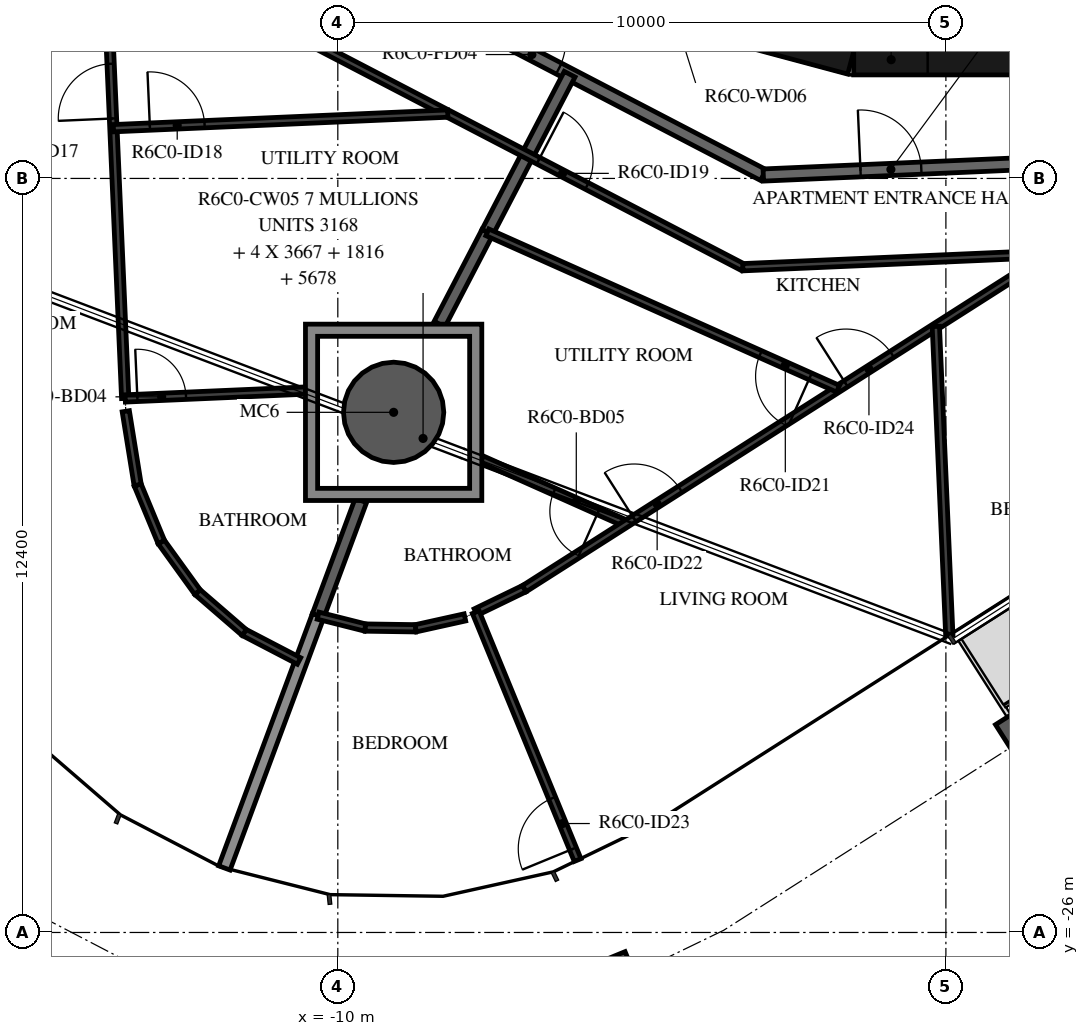
"""IFC4 building model, lengths in metres.
Left out: names, types, materials, properties, quantities, classifications, styles, units other than length and angle.
Written with IfcOpenShell. Run it as: python <this file> out.ifc"""

import sys

from ifc_helpers import new_model, si_unit, direction, frame, frame_2d, origin, origin_2d, place, context, subcontext, project, spatial, polyline, rectangle, hollow_circle, i_section, outline, extrude, element, fill, save


model = new_model("IFC4")
c1 = context("Model", 3, precision=1e-05, world=origin(), true_north=direction((0.0, 1.0)))
c2 = subcontext(c1, "Body", "Model", "MODEL_VIEW")
j1 = project(units=[si_unit("LENGTHUNIT", "METRE"), si_unit("PLANEANGLEUNIT", "RADIAN")], contexts=[c1])
p1 = place(None, origin())
s1 = spatial("IfcSite", under=j1, at=p1, CompositionType="ELEMENT")
p2 = place(p1, origin())
s2 = spatial("IfcBuilding", under=s1, at=p2, CompositionType="ELEMENT")
p3 = place(p2, frame((0.0, 0.0, 247.7)))
s3 = spatial("IfcBuildingStorey", under=s2, at=p3, CompositionType="ELEMENT", Elevation=247.7)
p4 = place(p3, frame((-9.082, -17.446, -0.38), z_axis=(0.0, 0.0, 1.0), x_axis=(1.0, 0.0, 0.0)))
e1 = element("IfcColumn", 1, at=p4, inside=s3, PredefinedType="COLUMN", context=c2, shape_type="SweptSolid", body=[
    extrude(hollow_circle(Radius=0.825, WallThickness=0.04, at=origin_2d()), origin(), (0.0, 0.0, 1.0), 3.5),
])
for number, where, z_axis, x_axis in (
    (2, (-5.243, -26.789, -0.38), (0.0, 0.0, 1.0), (-0.925, -0.38, 0.0)),
    (3, (1.185, -22.881, -0.38), (0.0, 0.0, 1.0), (-0.843, -0.537, 0.0)),
):
    element("IfcColumn", number, at=place(p3, frame(where, z_axis=z_axis, x_axis=x_axis)), inside=s3, PredefinedType="COLUMN", context=c2, shape_type="SweptSolid", body=[
        extrude(i_section(OverallWidth=0.3, OverallDepth=0.9, WebThickness=0.019, FlangeThickness=0.035, FilletRadius=0.03, at=origin_2d()), origin(), (0.0, 0.0, 1.0), 3.5),
    ])
p5 = place(p3, frame((-4.479, -10.858, 0.0), z_axis=(0.0, 0.0, 1.0), x_axis=(0.965948410781, -0.258734743916, 0.0)))
e4 = element("IfcWall", 4, at=p5, inside=s3, PredefinedType="SHEAR", context=c2, shape_type="SweptSolid", body=[
    extrude(rectangle(XDim=3.033, YDim=0.5, at=frame_2d((1.516, 0.0))), origin(), (0.0, 0.0, 1.0), 3.12),
])
p6 = place(p3, frame((-1.516, -11.647, 0.0), z_axis=(0.0, 0.0, 1.0), x_axis=(1.0, 0.0, 0.0)))
e5 = element("IfcWall", 5, at=p6, inside=s3, PredefinedType="SHEAR", context=c2, shape_type="SweptSolid", body=[
    extrude(rectangle(XDim=3.033, YDim=0.5, at=frame_2d((1.516, 0.0))), origin(), (0.0, 0.0, 1.0), 3.12),
])
p7 = place(p6, frame((0.016, 0.0, 0.0)))
e6 = element("IfcOpeningElement", 6, at=p7, cuts=e5, PredefinedType="OPENING", context=c2, shape_type="SweptSolid", body=[
    extrude(rectangle(XDim=1.2, YDim=2.1, at=frame_2d((0.6, 1.05))), frame((0.0, 0.26, 0.0), z_axis=(0.0, -1.0, 0.0), x_axis=(1.0, 0.0, 0.0)), (0.0, 0.0, 1.0), 0.52),
])
p8 = place(p3, frame((-9.372, -10.228, 0.0), z_axis=(0.0, 0.0, 1.0), x_axis=(0.887005184532, -0.461759464021, 0.0)))
e7 = element("IfcWall", 7, at=p8, inside=s3, PredefinedType="STANDARD", context=c2, shape_type="SweptSolid", body=[
    extrude(rectangle(XDim=7.181, YDim=0.2, at=frame_2d((3.591, 0.0))), origin(), (0.0, 0.0, 1.0), 3.12),
])
p9 = place(p8, frame((2.391, 0.0, 0.0)))
e8 = element("IfcOpeningElement", 8, at=p9, cuts=e7, PredefinedType="OPENING", context=c2, shape_type="SweptSolid", body=[
    extrude(rectangle(XDim=1.0, YDim=2.1, at=frame_2d((0.5, 1.05))), frame((0.0, 0.11, 0.0), z_axis=(0.0, -1.0, 0.0), x_axis=(1.0, 0.0, 0.0)), (0.0, 0.0, 1.0), 0.22),
])
p10 = place(p3, frame((-3.003, -13.544, 0.0), z_axis=(0.0, 0.0, 1.0), x_axis=(0.999048221872, 0.043619380718, 0.0)))
e9 = element("IfcWall", 9, at=p10, inside=s3, PredefinedType="STANDARD", context=c2, shape_type="SweptSolid", body=[
    extrude(rectangle(XDim=6.979, YDim=0.2, at=frame_2d((3.49, 0.0))), origin(), (0.0, 0.0, 1.0), 3.12),
])
p11 = place(p10, frame((1.6, 0.0, 0.0)))
e10 = element("IfcOpeningElement", 10, at=p11, cuts=e9, PredefinedType="OPENING", context=c2, shape_type="SweptSolid", body=[
    extrude(rectangle(XDim=1.0, YDim=2.1, at=frame_2d((0.5, 1.05))), frame((0.0, 0.11, 0.0), z_axis=(0.0, -1.0, 0.0), x_axis=(1.0, 0.0, 0.0)), (0.0, 0.0, 1.0), 0.22),
])
p12 = place(p3, frame((-7.541, -14.486, 0.0), z_axis=(0.0, 0.0, 1.0), x_axis=(0.461746051786, 0.88701216658, 0.0)))
e11 = element("IfcWall", 11, at=p12, inside=s3, PredefinedType="STANDARD", context=c2, shape_type="SweptSolid", body=[
    extrude(rectangle(XDim=2.931, YDim=0.2, at=frame_2d((1.466, 0.0))), origin(), (0.0, 0.0, 1.0), 3.12),
])
p13 = place(p3, frame((-11.865, -24.939, 0.0), z_axis=(0.0, 0.0, 1.0), x_axis=(0.348214227297, 0.937414983829, 0.0)))
e12 = element("IfcWall", 12, at=p13, inside=s3, PredefinedType="STANDARD", context=c2, shape_type="SweptSolid", body=[
    extrude(rectangle(XDim=4.426, YDim=0.2, at=frame_2d((2.213, 0.0))), origin(), (0.0, 0.0, 1.0), 2.73),
])
p14 = place(p3, frame((-8.327, -15.996, 0.0), z_axis=(0.0, 0.0, 1.0), x_axis=(0.461722915657, 0.887024210017, 0.0)))
e13 = element("IfcWall", 13, at=p14, inside=s3, PredefinedType="STANDARD", context=c2, shape_type="SweptSolid", body=[
    extrude(rectangle(XDim=1.703, YDim=0.2, at=frame_2d((0.851, 0.0))), origin(), (0.0, 0.0, 1.0), 3.12),
])
p15 = place(p3, frame((-10.324, -20.79, 0.0), z_axis=(0.0, 0.0, 1.0), x_axis=(0.348313973933, 0.937377925686, 0.0)))
e14 = element("IfcWall", 14, at=p15, inside=s3, PredefinedType="STANDARD", context=c2, shape_type="SweptSolid", body=[
    extrude(rectangle(XDim=2.02, YDim=0.2, at=frame_2d((1.01, 0.0))), origin(), (0.0, 0.0, 1.0), 3.12),
])
p16 = place(p3, frame((-10.421, -11.373, 0.0), z_axis=(0.0, 0.0, 1.0), x_axis=(0.887012970857, -0.461744506769, 0.0)))
e15 = element("IfcWall", 15, at=p16, inside=s3, PredefinedType="PARTITIONING", context=c2, shape_type="SweptSolid", body=[
    extrude(rectangle(XDim=7.985, YDim=0.12, at=frame_2d((3.992, 0.0))), origin(), (0.0, 0.0, 1.0), 3.12),
])
p17 = place(p16, frame((4.192, 0.0, 0.0)))
e16 = element("IfcOpeningElement", 16, at=p17, cuts=e15, PredefinedType="OPENING", context=c2, shape_type="SweptSolid", body=[
    extrude(rectangle(XDim=0.9, YDim=2.1, at=frame_2d((0.45, 1.05))), frame((0.0, 0.07, 0.0), z_axis=(0.0, -1.0, 0.0), x_axis=(1.0, 0.0, 0.0)), (0.0, 0.0, 1.0), 0.14),
])
p18 = place(p3, frame((-13.496, -17.218, 0.0), z_axis=(0.0, 0.0, 1.0), x_axis=(-0.043640714674, 0.999047290183, 0.0)))
e17 = element("IfcWall", 17, at=p18, inside=s3, PredefinedType="PARTITIONING", context=c2, shape_type="SweptSolid", body=[
    extrude(rectangle(XDim=8.487, YDim=0.12, at=frame_2d((4.243, 0.0))), origin(), (0.0, 0.0, 1.0), 3.12),
])
p19 = place(p18, frame((4.608, 0.0, 0.0)))
e18 = element("IfcOpeningElement", 18, at=p19, cuts=e17, PredefinedType="OPENING", context=c2, shape_type="SweptSolid", body=[
    extrude(rectangle(XDim=0.9, YDim=2.1, at=frame_2d((0.45, 1.05))), frame((0.0, 0.07, 0.0), z_axis=(0.0, -1.0, 0.0), x_axis=(1.0, 0.0, 0.0)), (0.0, 0.0, 1.0), 0.14),
])
p20 = place(p3, frame((-17.215, -14.57, 0.0), z_axis=(0.0, 0.0, 1.0), x_axis=(0.520949659667, 0.853587401555, 0.0)))
e19 = element("IfcWall", 19, at=p20, inside=s3, PredefinedType="PARTITIONING", context=c2, shape_type="SweptSolid", body=[
    extrude(rectangle(XDim=6.455, YDim=0.12, at=frame_2d((3.228, 0.0))), origin(), (0.0, 0.0, 1.0), 3.12),
])
p21 = place(p20, frame((1.2, 0.0, 0.0)))
e20 = element("IfcOpeningElement", 20, at=p21, cuts=e19, PredefinedType="OPENING", context=c2, shape_type="SweptSolid", body=[
    extrude(rectangle(XDim=0.9, YDim=2.1, at=frame_2d((0.45, 1.05))), frame((0.0, 0.07, 0.0), z_axis=(0.0, -1.0, 0.0), x_axis=(1.0, 0.0, 0.0)), (0.0, 0.0, 1.0), 0.14),
])
p22 = place(p3, frame((-13.69, -12.774, 0.0), z_axis=(0.0, 0.0, 1.0), x_axis=(0.999048778431, 0.043606631553, 0.0)))
e21 = element("IfcWall", 21, at=p22, inside=s3, PredefinedType="PARTITIONING", context=c2, shape_type="SweptSolid", body=[
    extrude(rectangle(XDim=5.503, YDim=0.12, at=frame_2d((2.752, 0.0))), origin(), (0.0, 0.0, 1.0), 3.12),
])
p23 = place(p22, frame((0.6, 0.0, 0.0)))
e22 = element("IfcOpeningElement", 22, at=p23, cuts=e21, PredefinedType="OPENING", context=c2, shape_type="SweptSolid", body=[
    extrude(rectangle(XDim=0.9, YDim=2.1, at=frame_2d((0.45, 1.05))), frame((0.0, 0.07, 0.0), z_axis=(0.0, -1.0, 0.0), x_axis=(1.0, 0.0, 0.0)), (0.0, 0.0, 1.0), 0.14),
])
for number, where, z_axis, x_axis in (
    (23, (-10.638, -21.536, 0.0), (0.0, 0.0, 1.0), (-0.887, 0.462, 0.0)),
    (24, (-11.539, -21.067, 0.0), (0.0, 0.0, 1.0), (-0.757, 0.654, 0.0)),
    (25, (-12.308, -20.402, 0.0), (0.0, 0.0, 1.0), (-0.585, 0.811, 0.0)),
):
    element("IfcWall", number, at=place(p3, frame(where, z_axis=z_axis, x_axis=x_axis)), inside=s3, PredefinedType="PARTITIONING", context=c2, shape_type="SweptSolid", body=[
        extrude(rectangle(XDim=1.016, YDim=0.12, at=frame_2d((0.508, 0.0))), origin(), (0.0, 0.0, 1.0), 3.12),
    ])
p24 = place(p3, frame((-12.903, -19.579, 0.0), z_axis=(0.0, 0.0, 1.0), x_axis=(-0.382754975976, 0.923849894932, 0.0)))
e26 = element("IfcWall", 26, at=p24, inside=s3, PredefinedType="PARTITIONING", context=c2, shape_type="SweptSolid", body=[
    extrude(rectangle(XDim=1.016, YDim=0.12, at=frame_2d((0.508, 0.0))), origin(), (0.0, 0.0, 1.0), 3.12),
])
p25 = place(p3, frame((-13.292, -18.64, 0.0), z_axis=(0.0, 0.0, 1.0), x_axis=(-0.159363796836, 0.98721992497, 0.0)))
e27 = element("IfcWall", 27, at=p25, inside=s3, PredefinedType="PARTITIONING", context=c2, shape_type="SweptSolid", body=[
    extrude(rectangle(XDim=1.227, YDim=0.12, at=frame_2d((0.614, 0.0))), origin(), (0.0, 0.0, 1.0), 3.12),
])
p26 = place(p3, frame((-13.496, -17.218, 0.0), z_axis=(0.0, 0.0, 1.0), x_axis=(0.999044946677, 0.043694330507, 0.0)))
e28 = element("IfcWall", 28, at=p26, inside=s3, PredefinedType="PARTITIONING", context=c2, shape_type="SweptSolid", body=[
    extrude(rectangle(XDim=2.967, YDim=0.12, at=frame_2d((1.483, 0.0))), origin(), (0.0, 0.0, 1.0), 3.12),
])
p27 = place(p26, frame((0.2, 0.0, 0.0)))
e29 = element("IfcOpeningElement", 29, at=p27, cuts=e28, PredefinedType="OPENING", context=c2, shape_type="SweptSolid", body=[
    extrude(rectangle(XDim=0.8, YDim=2.1, at=frame_2d((0.4, 1.05))), frame((0.0, 0.07, 0.0), z_axis=(0.0, -1.0, 0.0), x_axis=(1.0, 0.0, 0.0)), (0.0, 0.0, 1.0), 0.14),
])
p28 = place(p3, frame((-3.339, -15.06, 0.0), z_axis=(0.0, 0.0, 1.0), x_axis=(0.999047716945, 0.043630943905, 0.0)))
e30 = element("IfcWall", 30, at=p28, inside=s3, PredefinedType="PARTITIONING", context=c2, shape_type="SweptSolid", body=[
    extrude(rectangle(XDim=7.985, YDim=0.12, at=frame_2d((3.992, 0.0))), origin(), (0.0, 0.0, 1.0), 3.12),
])
p29 = place(p28, frame((5.253, 0.0, 0.0)))
e31 = element("IfcOpeningElement", 31, at=p29, cuts=e30, PredefinedType="OPENING", context=c2, shape_type="SweptSolid", body=[
    extrude(rectangle(XDim=0.9, YDim=2.1, at=frame_2d((0.45, 1.05))), frame((0.0, 0.07, 0.0), z_axis=(0.0, -1.0, 0.0), x_axis=(1.0, 0.0, 0.0)), (0.0, 0.0, 1.0), 0.14),
])
p30 = place(p3, frame((-10.324, -20.79, 0.0), z_axis=(0.0, 0.0, 1.0), x_axis=(0.969547579982, -0.244903021933, 0.0)))
e32 = element("IfcWall", 32, at=p30, inside=s3, PredefinedType="PARTITIONING", context=c2, shape_type="SweptSolid", body=[
    extrude(rectangle(XDim=0.801, YDim=0.12, at=frame_2d((0.4, 0.0))), origin(), (0.0, 0.0, 1.0), 3.12),
])
p31 = place(p3, frame((-9.548, -20.986, 0.0), z_axis=(0.0, 0.0, 1.0), x_axis=(0.999895921986, -0.014427237979, 0.0)))
e33 = element("IfcWall", 33, at=p31, inside=s3, PredefinedType="PARTITIONING", context=c2, shape_type="SweptSolid", body=[
    extrude(rectangle(XDim=0.829, YDim=0.12, at=frame_2d((0.415, 0.0))), origin(), (0.0, 0.0, 1.0), 3.12),
])
p32 = place(p3, frame((-8.719, -20.998, 0.0), z_axis=(0.0, 0.0, 1.0), x_axis=(0.976339323235, 0.216244134959, 0.0)))
e34 = element("IfcWall", 34, at=p32, inside=s3, PredefinedType="PARTITIONING", context=c2, shape_type="SweptSolid", body=[
    extrude(rectangle(XDim=0.829, YDim=0.12, at=frame_2d((0.414, 0.0))), origin(), (0.0, 0.0, 1.0), 3.12),
])
p33 = place(p3, frame((-5.256, -19.278, 0.0), z_axis=(0.0, 0.0, 1.0), x_axis=(-0.913284429849, 0.407322415532, 0.0)))
e35 = element("IfcWall", 35, at=p33, inside=s3, PredefinedType="PARTITIONING", context=c2, shape_type="SweptSolid", body=[
    extrude(rectangle(XDim=2.601, YDim=0.12, at=frame_2d((1.301, 0.0))), origin(), (0.0, 0.0, 1.0), 3.12),
])
p34 = place(p33, frame((0.5, 0.0, 0.0)))
e36 = element("IfcOpeningElement", 36, at=p34, cuts=e35, PredefinedType="OPENING", context=c2, shape_type="SweptSolid", body=[
    extrude(rectangle(XDim=0.8, YDim=2.1, at=frame_2d((0.4, 1.05))), frame((0.0, 0.07, 0.0), z_axis=(0.0, -1.0, 0.0), x_axis=(1.0, 0.0, 0.0)), (0.0, 0.0, 1.0), 0.14),
])
p35 = place(p3, frame((-7.732, -20.732, 0.0), z_axis=(0.0, 0.0, 1.0), x_axis=(0.900065466697, 0.435754696659, 0.0)))
e37 = element("IfcWall", 37, at=p35, inside=s3, PredefinedType="PARTITIONING", context=c2, shape_type="SweptSolid", body=[
    extrude(rectangle(XDim=0.889, YDim=0.12, at=frame_2d((0.445, 0.0))), origin(), (0.0, 0.0, 1.0), 3.12),
])
p36 = place(p3, frame((-6.932, -20.345, 0.0), z_axis=(0.0, 0.0, 1.0), x_axis=(0.843388627156, 0.537304032726, 0.0)))
e38 = element("IfcWall", 38, at=p36, inside=s3, PredefinedType="PARTITIONING", context=c2, shape_type="SweptSolid", body=[
    extrude(rectangle(XDim=10.246, YDim=0.12, at=frame_2d((5.123, 0.0))), origin(), (0.0, 0.0, 1.0), 3.12),
])
p37 = place(p36, frame((2.138, 0.0, 0.0)))
e39 = element("IfcOpeningElement", 39, at=p37, cuts=e38, PredefinedType="OPENING", context=c2, shape_type="SweptSolid", body=[
    extrude(rectangle(XDim=0.9, YDim=2.1, at=frame_2d((0.45, 1.05))), frame((0.0, 0.07, 0.0), z_axis=(0.0, -1.0, 0.0), x_axis=(1.0, 0.0, 0.0)), (0.0, 0.0, 1.0), 0.14),
])
p38 = place(p36, frame((6.268, 0.0, 0.0)))
e40 = element("IfcOpeningElement", 40, at=p38, cuts=e38, PredefinedType="OPENING", context=c2, shape_type="SweptSolid", body=[
    extrude(rectangle(XDim=0.9, YDim=2.1, at=frame_2d((0.45, 1.05))), frame((0.0, 0.07, 0.0), z_axis=(0.0, -1.0, 0.0), x_axis=(1.0, 0.0, 0.0)), (0.0, 0.0, 1.0), 0.14),
])
p39 = place(p3, frame((-6.057, -24.81, 0.0), z_axis=(0.0, 0.0, 1.0), x_axis=(-0.380044941584, 0.924968022354, 0.0)))
e41 = element("IfcWall", 41, at=p39, inside=s3, PredefinedType="PARTITIONING", context=c2, shape_type="SweptSolid", body=[
    extrude(rectangle(XDim=4.408, YDim=0.12, at=frame_2d((2.204, 0.0))), origin(), (0.0, 0.0, 1.0), 3.12),
])
p40 = place(p39, frame((0.2, 0.0, 0.0)))
e42 = element("IfcOpeningElement", 42, at=p40, cuts=e41, PredefinedType="OPENING", context=c2, shape_type="SweptSolid", body=[
    extrude(rectangle(XDim=0.9, YDim=2.1, at=frame_2d((0.45, 1.05))), frame((0.0, 0.07, 0.0), z_axis=(0.0, -1.0, 0.0), x_axis=(1.0, 0.0, 0.0)), (0.0, 0.0, 1.0), 0.14),
])
p41 = place(p3, frame((-1.773, -17.059, 0.0), z_axis=(0.0, 0.0, 1.0), x_axis=(-0.913279926902, 0.407332511736, 0.0)))
e43 = element("IfcWall", 43, at=p41, inside=s3, PredefinedType="PARTITIONING", context=c2, shape_type="SweptSolid", body=[
    extrude(rectangle(XDim=6.315, YDim=0.12, at=frame_2d((3.158, 0.0))), origin(), (0.0, 0.0, 1.0), 3.12),
])
p42 = place(p41, frame((0.5, 0.0, 0.0)))
e44 = element("IfcOpeningElement", 44, at=p42, cuts=e43, PredefinedType="OPENING", context=c2, shape_type="SweptSolid", body=[
    extrude(rectangle(XDim=0.9, YDim=2.1, at=frame_2d((0.45, 1.05))), frame((0.0, 0.07, 0.0), z_axis=(0.0, -1.0, 0.0), x_axis=(1.0, 0.0, 0.0)), (0.0, 0.0, 1.0), 0.14),
])
p43 = place(p3, frame((0.056, -21.11, 0.0), z_axis=(0.0, 0.0, 1.0), x_axis=(-0.043583193193, 0.999049801197, 0.0)))
e45 = element("IfcWall", 45, at=p43, inside=s3, PredefinedType="PARTITIONING", context=c2, shape_type="SweptSolid", body=[
    extrude(rectangle(XDim=5.081, YDim=0.12, at=frame_2d((2.541, 0.0))), origin(), (0.0, 0.0, 1.0), 3.12),
])
p44 = place(p3, origin())
e46 = element("IfcWall", 46, at=p44, inside=s3, PredefinedType="STANDARD", context=c2, shape_type="SweptSolid", body=[
    extrude(outline(polyline([(-7.632, -15.996), (-7.632, -18.896), (-10.532, -18.896), (-10.532, -15.996), (-7.632, -15.996)]), holes=[polyline([(-10.332, -18.696), (-7.832, -18.696), (-7.832, -16.196), (-10.332, -16.196), (-10.332, -18.696)])]), origin(), (0.0, 0.0, 1.0), 3.12),
])
p45 = place(p7, origin())
e47 = element("IfcDoor", 47, at=p45, inside=s3, OperationType="SINGLE_SWING_RIGHT", PredefinedType="DOOR", context=c2, shape_type="SweptSolid", body=[
    extrude(rectangle(XDim=1.2, YDim=2.1, at=frame_2d((0.6, 1.05))), frame((0.0, 0.025, 0.0), z_axis=(0.0, -1.0, 0.0), x_axis=(1.0, 0.0, 0.0)), (0.0, 0.0, 1.0), 0.05),
])
fill(e6, e47)
p46 = place(p9, origin())
e48 = element("IfcDoor", 48, at=p46, inside=s3, OperationType="SINGLE_SWING_RIGHT", PredefinedType="DOOR", context=c2, shape_type="SweptSolid", body=[
    extrude(rectangle(XDim=1.0, YDim=2.1, at=frame_2d((0.5, 1.05))), frame((0.0, 0.025, 0.0), z_axis=(0.0, -1.0, 0.0), x_axis=(1.0, 0.0, 0.0)), (0.0, 0.0, 1.0), 0.05),
])
fill(e8, e48)
p47 = place(p19, origin())
e49 = element("IfcDoor", 49, at=p47, inside=s3, OperationType="SINGLE_SWING_RIGHT", PredefinedType="DOOR", context=c2, shape_type="SweptSolid", body=[
    extrude(rectangle(XDim=0.9, YDim=2.1, at=frame_2d((0.45, 1.05))), frame((0.0, 0.025, 0.0), z_axis=(0.0, -1.0, 0.0), x_axis=(1.0, 0.0, 0.0)), (0.0, 0.0, 1.0), 0.05),
])
fill(e18, e49)
p48 = place(p23, origin())
e50 = element("IfcDoor", 50, at=p48, inside=s3, OperationType="SINGLE_SWING_RIGHT", PredefinedType="DOOR", context=c2, shape_type="SweptSolid", body=[
    extrude(rectangle(XDim=0.9, YDim=2.1, at=frame_2d((0.45, 1.05))), frame((0.0, 0.025, 0.0), z_axis=(0.0, -1.0, 0.0), x_axis=(1.0, 0.0, 0.0)), (0.0, 0.0, 1.0), 0.05),
])
fill(e22, e50)
p49 = place(p27, origin())
e51 = element("IfcDoor", 51, at=p49, inside=s3, OperationType="SINGLE_SWING_RIGHT", PredefinedType="DOOR", context=c2, shape_type="SweptSolid", body=[
    extrude(rectangle(XDim=0.8, YDim=2.1, at=frame_2d((0.4, 1.05))), frame((0.0, 0.025, 0.0), z_axis=(0.0, -1.0, 0.0), x_axis=(1.0, 0.0, 0.0)), (0.0, 0.0, 1.0), 0.05),
])
fill(e29, e51)
p50 = place(p11, origin())
e52 = element("IfcDoor", 52, at=p50, inside=s3, OperationType="SINGLE_SWING_LEFT", PredefinedType="DOOR", context=c2, shape_type="SweptSolid", body=[
    extrude(rectangle(XDim=1.0, YDim=2.1, at=frame_2d((0.5, 1.05))), frame((0.0, 0.025, 0.0), z_axis=(0.0, -1.0, 0.0), x_axis=(1.0, 0.0, 0.0)), (0.0, 0.0, 1.0), 0.05),
])
fill(e10, e52)
p51 = place(p17, origin())
e53 = element("IfcDoor", 53, at=p51, inside=s3, OperationType="SINGLE_SWING_LEFT", PredefinedType="DOOR", context=c2, shape_type="SweptSolid", body=[
    extrude(rectangle(XDim=0.9, YDim=2.1, at=frame_2d((0.45, 1.05))), frame((0.0, 0.025, 0.0), z_axis=(0.0, -1.0, 0.0), x_axis=(1.0, 0.0, 0.0)), (0.0, 0.0, 1.0), 0.05),
])
fill(e16, e53)
p52 = place(p42, origin())
e54 = element("IfcDoor", 54, at=p52, inside=s3, OperationType="SINGLE_SWING_LEFT", PredefinedType="DOOR", context=c2, shape_type="SweptSolid", body=[
    extrude(rectangle(XDim=0.9, YDim=2.1, at=frame_2d((0.45, 1.05))), frame((0.0, 0.025, 0.0), z_axis=(0.0, -1.0, 0.0), x_axis=(1.0, 0.0, 0.0)), (0.0, 0.0, 1.0), 0.05),
])
fill(e44, e54)
p53 = place(p34, origin())
e55 = element("IfcDoor", 55, at=p53, inside=s3, OperationType="SINGLE_SWING_LEFT", PredefinedType="DOOR", context=c2, shape_type="SweptSolid", body=[
    extrude(rectangle(XDim=0.8, YDim=2.1, at=frame_2d((0.4, 1.05))), frame((0.0, 0.025, 0.0), z_axis=(0.0, -1.0, 0.0), x_axis=(1.0, 0.0, 0.0)), (0.0, 0.0, 1.0), 0.05),
])
fill(e36, e55)
p54 = place(p37, origin())
e56 = element("IfcDoor", 56, at=p54, inside=s3, OperationType="SINGLE_SWING_LEFT", PredefinedType="DOOR", context=c2, shape_type="SweptSolid", body=[
    extrude(rectangle(XDim=0.9, YDim=2.1, at=frame_2d((0.45, 1.05))), frame((0.0, 0.025, 0.0), z_axis=(0.0, -1.0, 0.0), x_axis=(1.0, 0.0, 0.0)), (0.0, 0.0, 1.0), 0.05),
])
fill(e39, e56)
p55 = place(p40, origin())
e57 = element("IfcDoor", 57, at=p55, inside=s3, OperationType="SINGLE_SWING_LEFT", PredefinedType="DOOR", context=c2, shape_type="SweptSolid", body=[
    extrude(rectangle(XDim=0.9, YDim=2.1, at=frame_2d((0.45, 1.05))), frame((0.0, 0.025, 0.0), z_axis=(0.0, -1.0, 0.0), x_axis=(1.0, 0.0, 0.0)), (0.0, 0.0, 1.0), 0.05),
])
fill(e42, e57)
p56 = place(p38, origin())
e58 = element("IfcDoor", 58, at=p56, inside=s3, OperationType="SINGLE_SWING_RIGHT", PredefinedType="DOOR", context=c2, shape_type="SweptSolid", body=[
    extrude(rectangle(XDim=0.9, YDim=2.1, at=frame_2d((0.45, 1.05))), frame((0.0, 0.025, 0.0), z_axis=(0.0, -1.0, 0.0), x_axis=(1.0, 0.0, 0.0)), (0.0, 0.0, 1.0), 0.05),
])
fill(e40, e58)
save(model, sys.argv[1])
